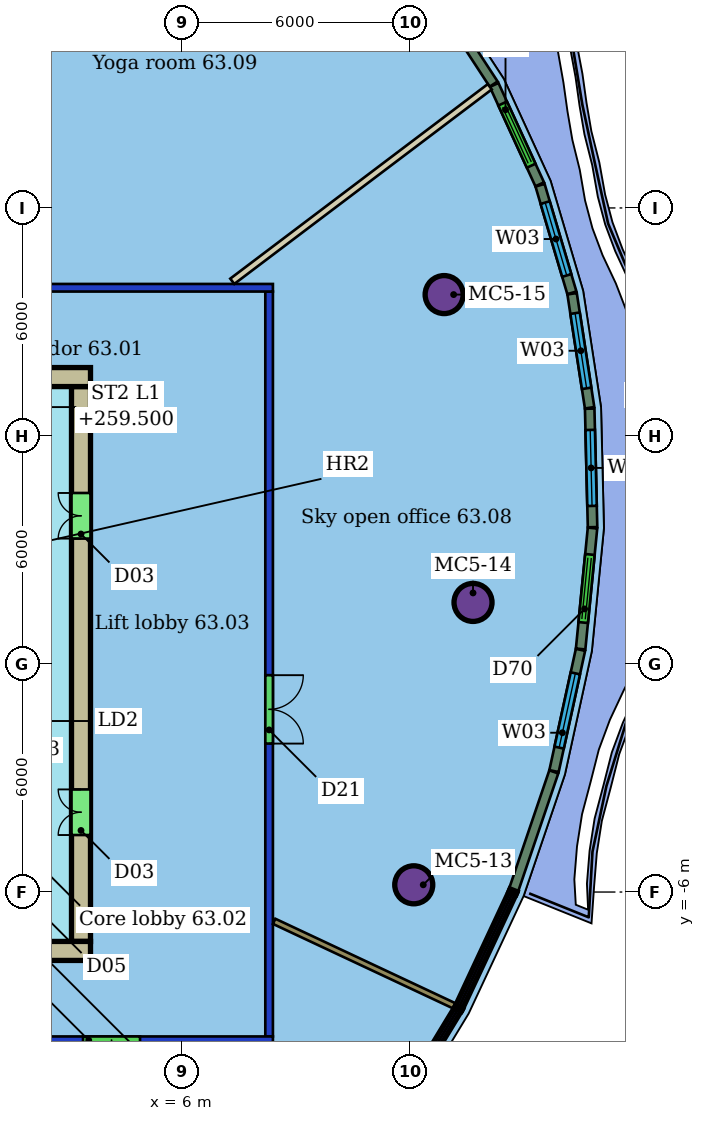
"""IFC4 building model, lengths in metres.
Left out: names, types, materials, properties, quantities, classifications, styles, units other than length and angle.
Written with IfcOpenShell. Run it as: python <this file> out.ifc"""

import sys

from ifc_helpers import new_model, si_unit, direction, frame, frame_2d, origin, origin_2d, place, context, subcontext, project, spatial, rectangle, hollow_circle, extrude, element, fill, save


model = new_model("IFC4")
c1 = context("Model", 3, precision=1e-05, world=origin(), true_north=direction((0.0, 1.0)))
c2 = subcontext(c1, "Body", "Model", "MODEL_VIEW")
j1 = project(units=[si_unit("LENGTHUNIT", "METRE"), si_unit("PLANEANGLEUNIT", "RADIAN")], contexts=[c1])
p1 = place(None, origin())
s1 = spatial("IfcSite", under=j1, at=p1, CompositionType="ELEMENT")
p2 = place(p1, origin())
s2 = spatial("IfcBuilding", under=s1, at=p2, CompositionType="ELEMENT")
p3 = place(p2, frame((0.0, 0.0, 257.7)))
s3 = spatial("IfcBuildingStorey", under=s2, at=p3, CompositionType="ELEMENT", Elevation=257.7)
for number, where, z_axis, x_axis in (
    (1, (12.106, -5.81, 0.0), (0.0, 0.0, 1.0), (1.0, 0.0, 0.0)),
    (2, (13.666, 1.62, 0.0), (0.0, 0.0, 1.0), (1.0, 0.0, 0.0)),
    (3, (12.906, 9.72, 0.0), (0.0, 0.0, 1.0), (1.0, 0.0, 0.0)),
):
    element("IfcColumn", number, at=place(p3, frame(where, z_axis=z_axis, x_axis=x_axis)), inside=s3, PredefinedType="COLUMN", context=c2, shape_type="SweptSolid", body=[
        extrude(hollow_circle(Radius=0.5, WallThickness=0.04, at=origin_2d()), origin(), (0.0, 0.0, 1.0), 3.45),
    ])
p4 = place(p3, frame((8.4, -9.9, 0.0), z_axis=(0.0, 0.0, 1.0), x_axis=(-1.0, 0.0, 0.0)))
e4 = element("IfcWall", 4, at=p4, inside=s3, PredefinedType="PARTITIONING", context=c2, shape_type="SweptSolid", body=[
    extrude(rectangle(XDim=28.8, YDim=0.2, at=frame_2d((14.4, 0.0))), origin(), (0.0, 0.0, 1.0), 3.1),
])
p5 = place(p4, frame((23.159, 0.0, 0.0)))
e5 = element("IfcOpeningElement", 5, at=p5, cuts=e4, PredefinedType="OPENING", context=c2, shape_type="SweptSolid", body=[
    extrude(rectangle(XDim=1.8, YDim=2.4, at=frame_2d((0.9, 1.2))), frame((0.0, 0.11, 0.0), z_axis=(0.0, -1.0, 0.0), x_axis=(1.0, 0.0, 0.0)), (0.0, 0.0, 1.0), 0.22),
])
p6 = place(p4, frame((17.296, 0.0, 0.0)))
e6 = element("IfcOpeningElement", 6, at=p6, cuts=e4, PredefinedType="OPENING", context=c2, shape_type="SweptSolid", body=[
    extrude(rectangle(XDim=1.5, YDim=2.4, at=frame_2d((0.75, 1.2))), frame((0.0, 0.11, 0.0), z_axis=(0.0, -1.0, 0.0), x_axis=(1.0, 0.0, 0.0)), (0.0, 0.0, 1.0), 0.22),
])
p7 = place(p4, frame((8.284, 0.0, 0.0)))
e7 = element("IfcOpeningElement", 7, at=p7, cuts=e4, PredefinedType="OPENING", context=c2, shape_type="SweptSolid", body=[
    extrude(rectangle(XDim=0.9, YDim=2.1, at=frame_2d((0.45, 1.05))), frame((0.0, 0.11, 0.0), z_axis=(0.0, -1.0, 0.0), x_axis=(1.0, 0.0, 0.0)), (0.0, 0.0, 1.0), 0.22),
])
p8 = place(p4, frame((3.497, 0.0, 0.0)))
e8 = element("IfcOpeningElement", 8, at=p8, cuts=e4, PredefinedType="OPENING", context=c2, shape_type="SweptSolid", body=[
    extrude(rectangle(XDim=1.5, YDim=2.1, at=frame_2d((0.75, 1.05))), frame((0.0, 0.11, 0.0), z_axis=(0.0, -1.0, 0.0), x_axis=(1.0, 0.0, 0.0)), (0.0, 0.0, 1.0), 0.22),
])
p9 = place(p3, frame((-20.4, 9.9, 0.0), z_axis=(0.0, 0.0, 1.0), x_axis=(1.0, 0.0, 0.0)))
e9 = element("IfcWall", 9, at=p9, inside=s3, PredefinedType="PARTITIONING", context=c2, shape_type="SweptSolid", body=[
    extrude(rectangle(XDim=28.8, YDim=0.2, at=frame_2d((14.4, 0.0))), origin(), (0.0, 0.0, 1.0), 3.1),
])
p10 = place(p9, frame((9.976, 0.0, 0.0)))
e10 = element("IfcOpeningElement", 10, at=p10, cuts=e9, PredefinedType="OPENING", context=c2, shape_type="SweptSolid", body=[
    extrude(rectangle(XDim=1.5, YDim=2.1, at=frame_2d((0.75, 1.05))), frame((0.0, 0.11, 0.0), z_axis=(0.0, -1.0, 0.0), x_axis=(1.0, 0.0, 0.0)), (0.0, 0.0, 1.0), 0.22),
])
p11 = place(p9, frame((21.079, 0.0, 0.0)))
e11 = element("IfcOpeningElement", 11, at=p11, cuts=e9, PredefinedType="OPENING", context=c2, shape_type="SweptSolid", body=[
    extrude(rectangle(XDim=1.0, YDim=2.1, at=frame_2d((0.5, 1.05))), frame((0.0, 0.11, 0.0), z_axis=(0.0, -1.0, 0.0), x_axis=(1.0, 0.0, 0.0)), (0.0, 0.0, 1.0), 0.22),
])
p12 = place(p3, frame((8.3, 9.8, 0.0), z_axis=(0.0, 0.0, 1.0), x_axis=(0.0, -1.0, 0.0)))
e12 = element("IfcWall", 12, at=p12, inside=s3, PredefinedType="PARTITIONING", context=c2, shape_type="SweptSolid", body=[
    extrude(rectangle(XDim=19.6, YDim=0.2, at=frame_2d((9.8, 0.0))), origin(), (0.0, 0.0, 1.0), 3.1),
])
p13 = place(p12, frame((10.094, 0.0, 0.0)))
e13 = element("IfcOpeningElement", 13, at=p13, cuts=e12, PredefinedType="OPENING", context=c2, shape_type="SweptSolid", body=[
    extrude(rectangle(XDim=1.8, YDim=2.1, at=frame_2d((0.9, 1.05))), frame((0.0, 0.11, 0.0), z_axis=(0.0, -1.0, 0.0), x_axis=(1.0, 0.0, 0.0)), (0.0, 0.0, 1.0), 0.22),
])
p14 = place(p3, frame((3.582, 23.679, 0.0), z_axis=(0.0, 0.0, 1.0), x_axis=(-0.375113366442, -0.926978943837, 0.0)))
e14 = element("IfcWall", 14, at=p14, inside=s3, PredefinedType="PARTITIONING", context=c2, shape_type="SweptSolid", body=[
    extrude(rectangle(XDim=14.721, YDim=0.175, at=frame_2d((7.361, 0.0))), origin(), (0.0, 0.0, 1.0), 3.45),
])
p15 = place(p3, frame((13.177, -8.997, 0.0), z_axis=(0.0, 0.0, 1.0), x_axis=(-0.90531006568, 0.424751321337, 0.0)))
e15 = element("IfcWall", 15, at=p15, inside=s3, PredefinedType="PARTITIONING", context=c2, shape_type="SweptSolid", body=[
    extrude(rectangle(XDim=5.241, YDim=0.15, at=frame_2d((2.621, 0.0))), origin(), (0.0, 0.0, 1.0), 3.45),
])
p16 = place(p3, frame((14.106, 15.188, 0.0), z_axis=(0.0, 0.0, 1.0), x_axis=(-0.797935541072, -0.602742791159, 0.0)))
e16 = element("IfcWall", 16, at=p16, inside=s3, PredefinedType="PARTITIONING", context=c2, shape_type="SweptSolid", body=[
    extrude(rectangle(XDim=8.491, YDim=0.175, at=frame_2d((4.246, 0.0))), origin(), (0.0, 0.0, 1.0), 3.45),
])
p17 = place(p3, frame((14.737, -5.941, 0.0), z_axis=(0.0, 0.0, 1.0), x_axis=(0.32181056212, 0.946804077995, 0.0)))
e17 = element("IfcWall", 17, at=p17, inside=s3, PredefinedType="SOLIDWALL", context=c2, shape_type="SweptSolid", body=[
    extrude(rectangle(XDim=3.277, YDim=0.25, at=frame_2d((1.638, 0.0))), origin(), (0.0, 0.0, 1.0), 3.15),
])
p18 = place(p3, frame((15.797, -2.818, 0.0), z_axis=(0.0, 0.0, 1.0), x_axis=(0.213366888583, 0.97697214436, 0.0)))
e18 = element("IfcWall", 18, at=p18, inside=s3, PredefinedType="SOLIDWALL", context=c2, shape_type="SweptSolid", body=[
    extrude(rectangle(XDim=3.266, YDim=0.25, at=frame_2d((1.633, 0.0))), origin(), (0.0, 0.0, 1.0), 3.15),
])
p19 = place(p18, frame((0.633, 0.0, 0.9)))
e19 = element("IfcOpeningElement", 19, at=p19, cuts=e18, PredefinedType="OPENING", context=c2, shape_type="SweptSolid", body=[
    extrude(rectangle(XDim=2.0, YDim=2.1, at=frame_2d((1.0, 1.05))), frame((0.0, 0.135, 0.0), z_axis=(0.0, -1.0, 0.0), x_axis=(1.0, 0.0, 0.0)), (0.0, 0.0, 1.0), 0.27),
])
p20 = place(p3, frame((16.497, 0.395, 0.0), z_axis=(0.0, 0.0, 1.0), x_axis=(0.097900668903, 0.995196191225, 0.0)))
e20 = element("IfcWall", 20, at=p20, inside=s3, PredefinedType="SOLIDWALL", context=c2, shape_type="SweptSolid", body=[
    extrude(rectangle(XDim=3.197, YDim=0.25, at=frame_2d((1.599, 0.0))), origin(), (0.0, 0.0, 1.0), 3.15),
])
p21 = place(p20, frame((0.699, 0.0, 0.0)))
e21 = element("IfcOpeningElement", 21, at=p21, cuts=e20, PredefinedType="OPENING", context=c2, shape_type="SweptSolid", body=[
    extrude(rectangle(XDim=1.8, YDim=2.4, at=frame_2d((0.9, 1.2))), frame((0.0, 0.135, 0.0), z_axis=(0.0, -1.0, 0.0), x_axis=(1.0, 0.0, 0.0)), (0.0, 0.0, 1.0), 0.27),
])
p22 = place(p3, frame((16.811, 3.6, 0.0), z_axis=(0.0, 0.0, 1.0), x_axis=(-0.024112016682, 0.999709263062, 0.0)))
e22 = element("IfcWall", 22, at=p22, inside=s3, PredefinedType="SOLIDWALL", context=c2, shape_type="SweptSolid", body=[
    extrude(rectangle(XDim=3.119, YDim=0.25, at=frame_2d((1.559, 0.0))), origin(), (0.0, 0.0, 1.0), 3.15),
])
p23 = place(p22, frame((0.559, 0.0, 0.9)))
e23 = element("IfcOpeningElement", 23, at=p23, cuts=e22, PredefinedType="OPENING", context=c2, shape_type="SweptSolid", body=[
    extrude(rectangle(XDim=2.0, YDim=2.1, at=frame_2d((1.0, 1.05))), frame((0.0, 0.135, 0.0), z_axis=(0.0, -1.0, 0.0), x_axis=(1.0, 0.0, 0.0)), (0.0, 0.0, 1.0), 0.27),
])
p24 = place(p3, frame((16.734, 6.742, 0.0), z_axis=(0.0, 0.0, 1.0), x_axis=(-0.151930263347, 0.988391215602, 0.0)))
e24 = element("IfcWall", 24, at=p24, inside=s3, PredefinedType="SOLIDWALL", context=c2, shape_type="SweptSolid", body=[
    extrude(rectangle(XDim=3.035, YDim=0.25, at=frame_2d((1.518, 0.0))), origin(), (0.0, 0.0, 1.0), 3.15),
])
p25 = place(p24, frame((0.518, 0.0, 0.9)))
e25 = element("IfcOpeningElement", 25, at=p25, cuts=e24, PredefinedType="OPENING", context=c2, shape_type="SweptSolid", body=[
    extrude(rectangle(XDim=2.0, YDim=2.1, at=frame_2d((1.0, 1.05))), frame((0.0, 0.135, 0.0), z_axis=(0.0, -1.0, 0.0), x_axis=(1.0, 0.0, 0.0)), (0.0, 0.0, 1.0), 0.27),
])
p26 = place(p3, frame((16.267, 9.767, 0.0), z_axis=(0.0, 0.0, 1.0), x_axis=(-0.283795508972, 0.958884825768, 0.0)))
e26 = element("IfcWall", 26, at=p26, inside=s3, PredefinedType="SOLIDWALL", context=c2, shape_type="SweptSolid", body=[
    extrude(rectangle(XDim=2.952, YDim=0.25, at=frame_2d((1.476, 0.0))), origin(), (0.0, 0.0, 1.0), 3.15),
])
p27 = place(p26, frame((0.476, 0.0, 0.9)))
e27 = element("IfcOpeningElement", 27, at=p27, cuts=e26, PredefinedType="OPENING", context=c2, shape_type="SweptSolid", body=[
    extrude(rectangle(XDim=2.0, YDim=2.1, at=frame_2d((1.0, 1.05))), frame((0.0, 0.135, 0.0), z_axis=(0.0, -1.0, 0.0), x_axis=(1.0, 0.0, 0.0)), (0.0, 0.0, 1.0), 0.27),
])
p28 = place(p3, frame((15.42, 12.622, 0.0), z_axis=(0.0, 0.0, 1.0), x_axis=(-0.416844676261, 0.908977731231, 0.0)))
e28 = element("IfcWall", 28, at=p28, inside=s3, PredefinedType="SOLIDWALL", context=c2, shape_type="SweptSolid", body=[
    extrude(rectangle(XDim=2.876, YDim=0.25, at=frame_2d((1.438, 0.0))), origin(), (0.0, 0.0, 1.0), 3.15),
])
p29 = place(p28, frame((0.538, 0.0, 0.0)))
e29 = element("IfcOpeningElement", 29, at=p29, cuts=e28, PredefinedType="OPENING", context=c2, shape_type="SweptSolid", body=[
    extrude(rectangle(XDim=1.8, YDim=2.4, at=frame_2d((0.9, 1.2))), frame((0.0, 0.135, 0.0), z_axis=(0.0, -1.0, 0.0), x_axis=(1.0, 0.0, 0.0)), (0.0, 0.0, 1.0), 0.27),
])
p30 = place(p3, frame((14.208, 15.26, 0.0), z_axis=(0.0, 0.0, 1.0), x_axis=(-0.547256484876, 0.836964957308, 0.0)))
e30 = element("IfcWall", 30, at=p30, inside=s3, PredefinedType="SOLIDWALL", context=c2, shape_type="SweptSolid", body=[
    extrude(rectangle(XDim=2.771, YDim=0.25, at=frame_2d((1.385, 0.0))), origin(), (0.0, 0.0, 1.0), 3.15),
])
p31 = place(p3, frame((3.6, 7.55, 0.0), z_axis=(0.0, 0.0, 1.0), x_axis=(-1.0, 0.0, 0.0)))
e31 = element("IfcWall", 31, at=p31, inside=s3, PredefinedType="SHEAR", context=c2, shape_type="SweptSolid", body=[
    extrude(rectangle(XDim=9.6, YDim=0.5, at=frame_2d((4.8, 0.0))), origin(), (0.0, 0.0, 1.0), 3.3),
])
p32 = place(p31, frame((3.2, 0.0, 0.0)))
e32 = element("IfcOpeningElement", 32, at=p32, cuts=e31, PredefinedType="OPENING", context=c2, shape_type="SweptSolid", body=[
    extrude(rectangle(XDim=1.2, YDim=2.1, at=frame_2d((0.6, 1.05))), frame((0.0, 0.26, 0.0), z_axis=(0.0, -1.0, 0.0), x_axis=(1.0, 0.0, 0.0)), (0.0, 0.0, 1.0), 0.52),
])
p33 = place(p3, frame((-15.6, -7.55, 0.0), z_axis=(0.0, 0.0, 1.0), x_axis=(1.0, 0.0, 0.0)))
e33 = element("IfcWall", 33, at=p33, inside=s3, PredefinedType="SHEAR", context=c2, shape_type="SweptSolid", body=[
    extrude(rectangle(XDim=19.2, YDim=0.5, at=frame_2d((9.6, 0.0))), origin(), (0.0, 0.0, 1.0), 3.3),
])
p34 = place(p33, frame((3.6, 0.0, 0.0)))
e34 = element("IfcOpeningElement", 34, at=p34, cuts=e33, PredefinedType="OPENING", context=c2, shape_type="SweptSolid", body=[
    extrude(rectangle(XDim=1.2, YDim=2.1, at=frame_2d((0.6, 1.05))), frame((0.0, 0.26, 0.0), z_axis=(0.0, -1.0, 0.0), x_axis=(1.0, 0.0, 0.0)), (0.0, 0.0, 1.0), 0.52),
])
p35 = place(p3, frame((3.35, -7.3, 0.0), z_axis=(0.0, 0.0, 1.0), x_axis=(0.0, 1.0, 0.0)))
e35 = element("IfcWall", 35, at=p35, inside=s3, PredefinedType="SHEAR", context=c2, shape_type="SweptSolid", body=[
    extrude(rectangle(XDim=14.6, YDim=0.5, at=frame_2d((7.3, 0.0))), origin(), (0.0, 0.0, 1.0), 3.3),
])
p36 = place(p35, frame((2.8, 0.0, 0.0)))
e36 = element("IfcOpeningElement", 36, at=p36, cuts=e35, PredefinedType="OPENING", context=c2, shape_type="SweptSolid", body=[
    extrude(rectangle(XDim=1.2, YDim=2.1, at=frame_2d((0.6, 1.05))), frame((0.0, 0.26, 0.0), z_axis=(0.0, -1.0, 0.0), x_axis=(1.0, 0.0, 0.0)), (0.0, 0.0, 1.0), 0.52),
])
p37 = place(p35, frame((10.6, 0.0, 0.0)))
e37 = element("IfcOpeningElement", 37, at=p37, cuts=e35, PredefinedType="OPENING", context=c2, shape_type="SweptSolid", body=[
    extrude(rectangle(XDim=1.2, YDim=2.1, at=frame_2d((0.6, 1.05))), frame((0.0, 0.26, 0.0), z_axis=(0.0, -1.0, 0.0), x_axis=(1.0, 0.0, 0.0)), (0.0, 0.0, 1.0), 0.52),
])
p38 = place(p8, origin())
e38 = element("IfcDoor", 38, at=p38, inside=s3, OperationType="DOUBLE_DOOR_SINGLE_SWING", PredefinedType="DOOR", context=c2, shape_type="SweptSolid", body=[
    extrude(rectangle(XDim=1.5, YDim=2.1, at=frame_2d((0.75, 1.05))), frame((0.0, 0.025, 0.0), z_axis=(0.0, -1.0, 0.0), x_axis=(1.0, 0.0, 0.0)), (0.0, 0.0, 1.0), 0.05),
])
fill(e8, e38)
p39 = place(p13, origin())
e39 = element("IfcDoor", 39, at=p39, inside=s3, OperationType="DOUBLE_DOOR_SINGLE_SWING", PredefinedType="DOOR", context=c2, shape_type="SweptSolid", body=[
    extrude(rectangle(XDim=1.8, YDim=2.1, at=frame_2d((0.9, 1.05))), frame((0.0, 0.025, 0.0), z_axis=(0.0, -1.0, 0.0), x_axis=(1.0, 0.0, 0.0)), (0.0, 0.0, 1.0), 0.05),
])
fill(e13, e39)
p40 = place(p19, origin())
e40 = element("IfcWindow", 40, at=p40, inside=s3, PartitioningType="SINGLE_PANEL", PredefinedType="WINDOW", context=c2, shape_type="SweptSolid", body=[
    extrude(rectangle(XDim=2.0, YDim=2.1, at=frame_2d((1.0, 1.05))), frame((0.0, 0.03, 0.0), z_axis=(0.0, -1.0, 0.0), x_axis=(1.0, 0.0, 0.0)), (0.0, 0.0, 1.0), 0.06),
])
fill(e19, e40)
p41 = place(p21, origin())
e41 = element("IfcDoor", 41, at=p41, inside=s3, OperationType="DOUBLE_DOOR_SLIDING", PredefinedType="DOOR", context=c2, shape_type="SweptSolid", body=[
    extrude(rectangle(XDim=1.8, YDim=2.4, at=frame_2d((0.9, 1.2))), frame((0.0, 0.025, 0.0), z_axis=(0.0, -1.0, 0.0), x_axis=(1.0, 0.0, 0.0)), (0.0, 0.0, 1.0), 0.05),
])
fill(e21, e41)
p42 = place(p23, origin())
e42 = element("IfcWindow", 42, at=p42, inside=s3, PartitioningType="SINGLE_PANEL", PredefinedType="WINDOW", context=c2, shape_type="SweptSolid", body=[
    extrude(rectangle(XDim=2.0, YDim=2.1, at=frame_2d((1.0, 1.05))), frame((0.0, 0.03, 0.0), z_axis=(0.0, -1.0, 0.0), x_axis=(1.0, 0.0, 0.0)), (0.0, 0.0, 1.0), 0.06),
])
fill(e23, e42)
p43 = place(p25, origin())
e43 = element("IfcWindow", 43, at=p43, inside=s3, PartitioningType="SINGLE_PANEL", PredefinedType="WINDOW", context=c2, shape_type="SweptSolid", body=[
    extrude(rectangle(XDim=2.0, YDim=2.1, at=frame_2d((1.0, 1.05))), frame((0.0, 0.03, 0.0), z_axis=(0.0, -1.0, 0.0), x_axis=(1.0, 0.0, 0.0)), (0.0, 0.0, 1.0), 0.06),
])
fill(e25, e43)
p44 = place(p27, origin())
e44 = element("IfcWindow", 44, at=p44, inside=s3, PartitioningType="SINGLE_PANEL", PredefinedType="WINDOW", context=c2, shape_type="SweptSolid", body=[
    extrude(rectangle(XDim=2.0, YDim=2.1, at=frame_2d((1.0, 1.05))), frame((0.0, 0.03, 0.0), z_axis=(0.0, -1.0, 0.0), x_axis=(1.0, 0.0, 0.0)), (0.0, 0.0, 1.0), 0.06),
])
fill(e27, e44)
p45 = place(p29, origin())
e45 = element("IfcDoor", 45, at=p45, inside=s3, OperationType="DOUBLE_DOOR_SLIDING", PredefinedType="DOOR", context=c2, shape_type="SweptSolid", body=[
    extrude(rectangle(XDim=1.8, YDim=2.4, at=frame_2d((0.9, 1.2))), frame((0.0, 0.025, 0.0), z_axis=(0.0, -1.0, 0.0), x_axis=(1.0, 0.0, 0.0)), (0.0, 0.0, 1.0), 0.05),
])
fill(e29, e45)
p46 = place(p36, origin())
e46 = element("IfcDoor", 46, at=p46, inside=s3, OperationType="DOUBLE_DOOR_SINGLE_SWING", PredefinedType="NOTDEFINED", context=c2, shape_type="SweptSolid", body=[
    extrude(rectangle(XDim=1.2, YDim=2.1, at=frame_2d((0.6, 1.05))), frame((0.0, 0.025, 0.0), z_axis=(0.0, -1.0, 0.0), x_axis=(1.0, 0.0, 0.0)), (0.0, 0.0, 1.0), 0.05),
])
fill(e36, e46)
p47 = place(p37, origin())
e47 = element("IfcDoor", 47, at=p47, inside=s3, OperationType="DOUBLE_DOOR_SINGLE_SWING", PredefinedType="NOTDEFINED", context=c2, shape_type="SweptSolid", body=[
    extrude(rectangle(XDim=1.2, YDim=2.1, at=frame_2d((0.6, 1.05))), frame((0.0, 0.025, 0.0), z_axis=(0.0, -1.0, 0.0), x_axis=(1.0, 0.0, 0.0)), (0.0, 0.0, 1.0), 0.05),
])
fill(e37, e47)
save(model, sys.argv[1])
